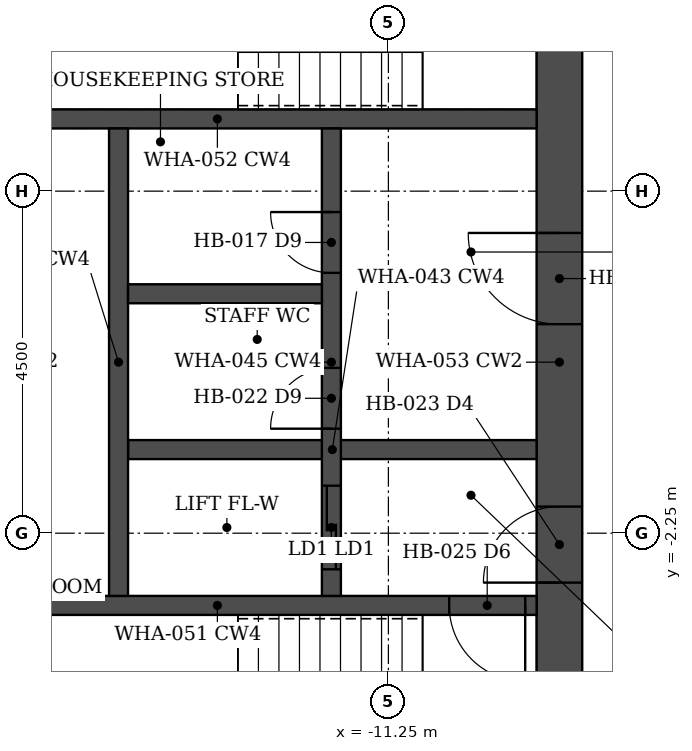
"""IFC4 building model, lengths in metres.
Left out: names, types, materials, properties, quantities, classifications, styles, units other than length and angle.
Written with IfcOpenShell. Run it as: python <this file> out.ifc"""

import sys

from ifc_helpers import new_model, si_unit, direction, frame, frame_2d, origin, place, context, subcontext, project, spatial, rectangle, extrude, element, fill, save


model = new_model("IFC4")
c1 = context("Model", 3, precision=1e-05, world=origin(), true_north=direction((0.0, 1.0)))
c2 = subcontext(c1, "Body", "Model", "MODEL_VIEW")
j1 = project(units=[si_unit("LENGTHUNIT", "METRE"), si_unit("PLANEANGLEUNIT", "RADIAN")], contexts=[c1])
p1 = place(None, origin())
s1 = spatial("IfcSite", under=j1, at=p1, CompositionType="ELEMENT")
p2 = place(p1, origin())
s2 = spatial("IfcBuilding", under=s1, at=p2, CompositionType="ELEMENT")
p3 = place(p2, frame((0.0, 0.0, 129.2)))
s3 = spatial("IfcBuildingStorey", under=s2, at=p3, CompositionType="ELEMENT", Elevation=129.2)
p4 = place(p3, frame((-9.0, -6.45, 0.0), z_axis=(0.0, 0.0, 1.0), x_axis=(0.0, 1.0, 0.0)))
e1 = element("IfcWall", 1, at=p4, inside=s3, PredefinedType="SHEAR", context=c2, shape_type="SweptSolid", body=[
    extrude(rectangle(XDim=12.9, YDim=0.6, at=frame_2d((6.45, 0.0))), origin(), (0.0, 0.0, 1.0), 3.6),
])
p5 = place(p4, frame((3.55, 0.0, 0.0)))
e2 = element("IfcOpeningElement", 2, at=p5, cuts=e1, PredefinedType="OPENING", context=c2, shape_type="SweptSolid", body=[
    extrude(rectangle(XDim=1.0, YDim=2.1, at=frame_2d((0.5, 1.05))), frame((0.0, 0.31, 0.0), z_axis=(0.0, -1.0, 0.0), x_axis=(1.0, 0.0, 0.0)), (0.0, 0.0, 1.0), 0.62),
])
p6 = place(p4, frame((6.95, 0.0, 0.0)))
e3 = element("IfcOpeningElement", 3, at=p6, cuts=e1, PredefinedType="OPENING", context=c2, shape_type="SweptSolid", body=[
    extrude(rectangle(XDim=1.2, YDim=2.1, at=frame_2d((0.6, 1.05))), frame((0.0, 0.31, 0.0), z_axis=(0.0, -1.0, 0.0), x_axis=(1.0, 0.0, 0.0)), (0.0, 0.0, 1.0), 0.62),
])
p7 = place(p4, frame((10.85, 0.0, 0.0)))
e4 = element("IfcOpeningElement", 4, at=p7, cuts=e1, PredefinedType="OPENING", context=c2, shape_type="SweptSolid", body=[
    extrude(rectangle(XDim=1.0, YDim=2.1, at=frame_2d((0.5, 1.05))), frame((0.0, 0.31, 0.0), z_axis=(0.0, -1.0, 0.0), x_axis=(1.0, 0.0, 0.0)), (0.0, 0.0, 1.0), 0.62),
])
p8 = place(p3, frame((-9.3, -3.2, 0.0), z_axis=(0.0, 0.0, 1.0), x_axis=(-1.0, 0.0, 0.0)))
e5 = element("IfcWall", 5, at=p8, inside=s3, PredefinedType="SHEAR", context=c2, shape_type="SweptSolid", body=[
    extrude(rectangle(XDim=8.4, YDim=0.25, at=frame_2d((4.2, 0.0))), origin(), (0.0, 0.0, 1.0), 3.6),
])
p9 = place(p8, frame((0.15, 0.0, 0.0)))
e6 = element("IfcOpeningElement", 6, at=p9, cuts=e5, PredefinedType="OPENING", context=c2, shape_type="SweptSolid", body=[
    extrude(rectangle(XDim=1.0, YDim=2.1, at=frame_2d((0.5, 1.05))), frame((0.0, 0.135, 0.0), z_axis=(0.0, -1.0, 0.0), x_axis=(1.0, 0.0, 0.0)), (0.0, 0.0, 1.0), 0.27),
])
p10 = place(p3, frame((-9.3, 3.2, 0.0), z_axis=(0.0, 0.0, 1.0), x_axis=(-1.0, 0.0, 0.0)))
e7 = element("IfcWall", 7, at=p10, inside=s3, PredefinedType="SHEAR", context=c2, shape_type="SweptSolid", body=[
    extrude(rectangle(XDim=8.4, YDim=0.25, at=frame_2d((4.2, 0.0))), origin(), (0.0, 0.0, 1.0), 3.6),
])
p11 = place(p3, frame((-9.3, -1.15, 0.0), z_axis=(0.0, 0.0, 1.0), x_axis=(-1.0, 0.0, 0.0)))
e8 = element("IfcWall", 8, at=p11, inside=s3, PredefinedType="SHEAR", context=c2, shape_type="SweptSolid", body=[
    extrude(rectangle(XDim=5.375, YDim=0.25, at=frame_2d((2.688, 0.0))), origin(), (0.0, 0.0, 1.0), 3.6),
])
p12 = place(p3, frame((-12.0, -3.075, 0.0), z_axis=(0.0, 0.0, 1.0), x_axis=(0.0, 1.0, 0.0)))
e9 = element("IfcWall", 9, at=p12, inside=s3, PredefinedType="SHEAR", context=c2, shape_type="SweptSolid", body=[
    extrude(rectangle(XDim=6.15, YDim=0.25, at=frame_2d((3.075, 0.0))), origin(), (0.0, 0.0, 1.0), 3.6),
])
p13 = place(p12, frame((2.2, 0.0, 0.0)))
e10 = element("IfcOpeningElement", 10, at=p13, cuts=e9, PredefinedType="OPENING", context=c2, shape_type="SweptSolid", body=[
    extrude(rectangle(XDim=0.8, YDim=2.1, at=frame_2d((0.4, 1.05))), frame((0.0, 0.135, 0.0), z_axis=(0.0, -1.0, 0.0), x_axis=(1.0, 0.0, 0.0)), (0.0, 0.0, 1.0), 0.27),
])
p14 = place(p12, frame((4.25, 0.0, 0.0)))
e11 = element("IfcOpeningElement", 11, at=p14, cuts=e9, PredefinedType="OPENING", context=c2, shape_type="SweptSolid", body=[
    extrude(rectangle(XDim=0.8, YDim=2.1, at=frame_2d((0.4, 1.05))), frame((0.0, 0.135, 0.0), z_axis=(0.0, -1.0, 0.0), x_axis=(1.0, 0.0, 0.0)), (0.0, 0.0, 1.0), 0.27),
])
p15 = place(p12, frame((0.35, 0.0, 0.0)))
e12 = element("IfcOpeningElement", 12, at=p15, cuts=e9, PredefinedType="OPENING", context=c2, shape_type="SweptSolid", body=[
    extrude(rectangle(XDim=1.1, YDim=2.1, at=frame_2d((0.55, 1.05))), frame((0.0, 0.135, 0.0), z_axis=(0.0, -1.0, 0.0), x_axis=(1.0, 0.0, 0.0)), (0.0, 0.0, 1.0), 0.27),
])
p16 = place(p3, frame((-14.8, -3.075, 0.0), z_axis=(0.0, 0.0, 1.0), x_axis=(0.0, 1.0, 0.0)))
e13 = element("IfcWall", 13, at=p16, inside=s3, PredefinedType="SHEAR", context=c2, shape_type="SweptSolid", body=[
    extrude(rectangle(XDim=6.15, YDim=0.25, at=frame_2d((3.075, 0.0))), origin(), (0.0, 0.0, 1.0), 3.6),
])
p17 = place(p3, frame((-12.125, 0.9, 0.0), z_axis=(0.0, 0.0, 1.0), x_axis=(-1.0, 0.0, 0.0)))
e14 = element("IfcWall", 14, at=p17, inside=s3, PredefinedType="SHEAR", context=c2, shape_type="SweptSolid", body=[
    extrude(rectangle(XDim=2.55, YDim=0.25, at=frame_2d((1.275, 0.0))), origin(), (0.0, 0.0, 1.0), 3.6),
])
p18 = place(p5, origin())
e15 = element("IfcDoor", 15, at=p18, inside=s3, OperationType="SINGLE_SWING_LEFT", PredefinedType="DOOR", context=c2, shape_type="SweptSolid", body=[
    extrude(rectangle(XDim=1.0, YDim=2.1, at=frame_2d((0.5, 1.05))), frame((0.0, 0.025, 0.0), z_axis=(0.0, -1.0, 0.0), x_axis=(1.0, 0.0, 0.0)), (0.0, 0.0, 1.0), 0.05),
])
fill(e2, e15)
p19 = place(p9, origin())
e16 = element("IfcDoor", 16, at=p19, inside=s3, OperationType="SINGLE_SWING_LEFT", PredefinedType="DOOR", context=c2, shape_type="SweptSolid", body=[
    extrude(rectangle(XDim=1.0, YDim=2.1, at=frame_2d((0.5, 1.05))), frame((0.0, 0.025, 0.0), z_axis=(0.0, -1.0, 0.0), x_axis=(1.0, 0.0, 0.0)), (0.0, 0.0, 1.0), 0.05),
])
fill(e6, e16)
p20 = place(p6, origin())
e17 = element("IfcDoor", 17, at=p20, inside=s3, OperationType="SINGLE_SWING_RIGHT", PredefinedType="DOOR", context=c2, shape_type="SweptSolid", body=[
    extrude(rectangle(XDim=1.2, YDim=2.1, at=frame_2d((0.6, 1.05))), frame((0.0, 0.025, 0.0), z_axis=(0.0, -1.0, 0.0), x_axis=(1.0, 0.0, 0.0)), (0.0, 0.0, 1.0), 0.05),
])
fill(e3, e17)
p21 = place(p13, origin())
e18 = element("IfcDoor", 18, at=p21, inside=s3, OperationType="SINGLE_SWING_LEFT", PredefinedType="DOOR", context=c2, shape_type="SweptSolid", body=[
    extrude(rectangle(XDim=0.8, YDim=2.1, at=frame_2d((0.4, 1.05))), frame((0.0, 0.025, 0.0), z_axis=(0.0, -1.0, 0.0), x_axis=(1.0, 0.0, 0.0)), (0.0, 0.0, 1.0), 0.05),
])
fill(e10, e18)
p22 = place(p14, origin())
e19 = element("IfcDoor", 19, at=p22, inside=s3, OperationType="SINGLE_SWING_RIGHT", PredefinedType="DOOR", context=c2, shape_type="SweptSolid", body=[
    extrude(rectangle(XDim=0.8, YDim=2.1, at=frame_2d((0.4, 1.05))), frame((0.0, 0.025, 0.0), z_axis=(0.0, -1.0, 0.0), x_axis=(1.0, 0.0, 0.0)), (0.0, 0.0, 1.0), 0.05),
])
fill(e11, e19)
p23 = place(p15, origin())
e20 = element("IfcDoor", 20, at=p23, inside=s3, OperationType="DOUBLE_DOOR_SLIDING", PredefinedType="DOOR", context=c2, shape_type="SweptSolid", body=[
    extrude(rectangle(XDim=1.1, YDim=2.1, at=frame_2d((0.55, 1.05))), frame((0.0, 0.025, 0.0), z_axis=(0.0, -1.0, 0.0), x_axis=(1.0, 0.0, 0.0)), (0.0, 0.0, 1.0), 0.05),
])
fill(e12, e20)
save(model, sys.argv[1])
